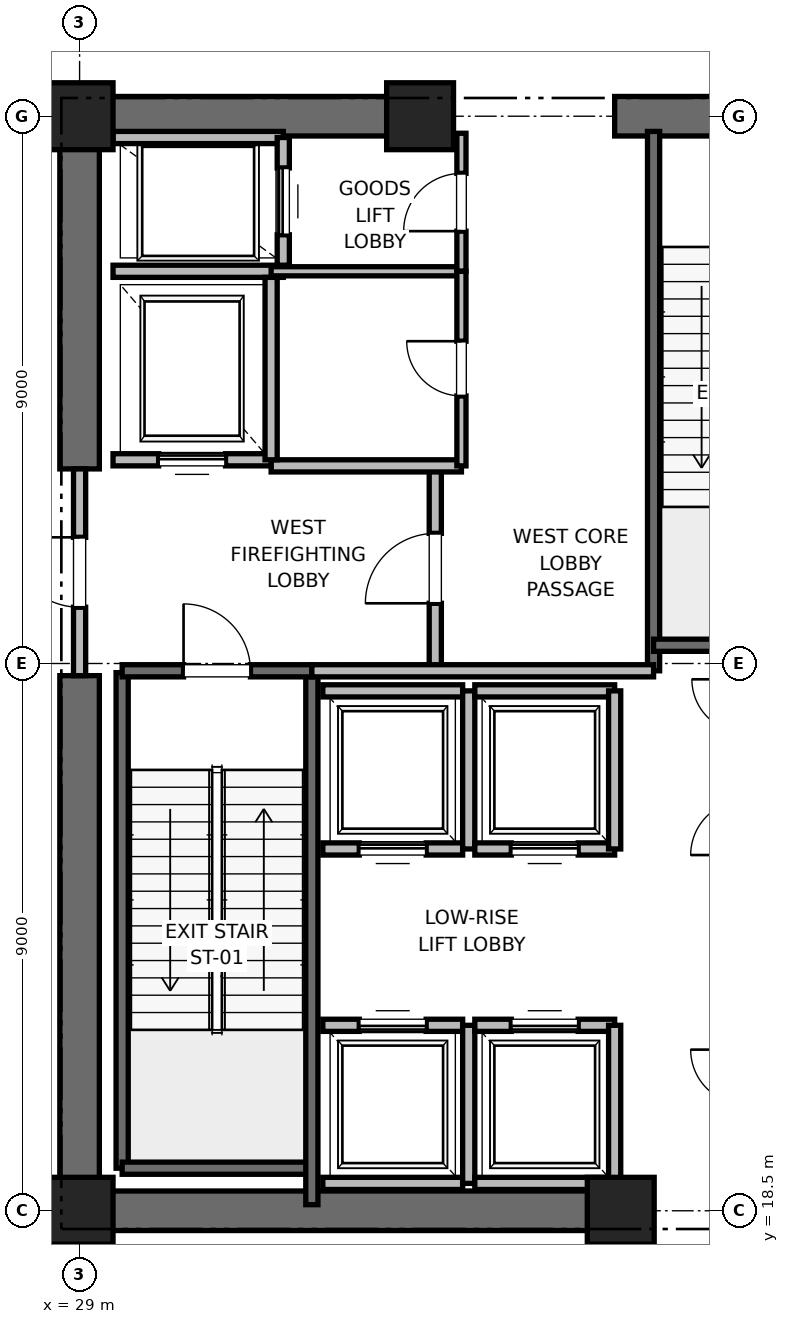
"""IFC4 building model, lengths in metres.
Left out: names, types, materials, properties, quantities, classifications, styles, units other than length and angle.
Written with IfcOpenShell. Run it as: python <this file> out.ifc"""

import sys

from ifc_helpers import new_model, si_unit, direction, frame, frame_2d, origin, origin_2d, place, context, subcontext, project, spatial, rectangle, extrude, element, fill, save


model = new_model("IFC4")
c1 = context("Model", 3, precision=1e-05, world=origin(), true_north=direction((0.0, 1.0)))
c2 = subcontext(c1, "Body", "Model", "MODEL_VIEW")
j1 = project(units=[si_unit("LENGTHUNIT", "METRE"), si_unit("PLANEANGLEUNIT", "RADIAN")], contexts=[c1])
p1 = place(None, origin())
s1 = spatial("IfcSite", under=j1, at=p1, CompositionType="ELEMENT")
p2 = place(p1, origin())
s2 = spatial("IfcBuilding", under=s1, at=p2, CompositionType="ELEMENT")
p3 = place(p2, frame((0.0, 0.0, 113.0)))
s3 = spatial("IfcBuildingStorey", under=s2, at=p3, CompositionType="ELEMENT", Elevation=113.0)
for number, where, z_axis, x_axis in (
    (1, (29.0, 18.5, 0.0), (0.0, 0.0, 1.0), (1.0, 0.0, 0.0)),
    (2, (29.0, 36.5, 0.0), (0.0, 0.0, 1.0), (1.0, 0.0, 0.0)),
    (3, (37.9, 18.5, 0.0), (0.0, 0.0, 1.0), (1.0, 0.0, 0.0)),
    (4, (34.6, 36.5, 0.0), (0.0, 0.0, 1.0), (1.0, 0.0, 0.0)),
):
    element("IfcColumn", number, at=place(p3, frame(where, z_axis=z_axis, x_axis=x_axis)), inside=s3, PredefinedType="PILASTER", context=c2, shape_type="SweptSolid", body=[
        extrude(rectangle(XDim=1.1, YDim=1.1, at=origin_2d()), origin(), (0.0, 0.0, 1.0), 5.4),
    ])
p4 = place(p3, frame((29.0, 18.5, 0.0), z_axis=(0.0, 0.0, 1.0), x_axis=(1.0, 0.0, 0.0)))
e5 = element("IfcWall", 5, at=p4, inside=s3, PredefinedType="SHEAR", context=c2, shape_type="SweptSolid", body=[
    extrude(rectangle(XDim=9.2, YDim=0.65, at=frame_2d((4.6, 0.0))), origin(), (0.0, 0.0, 1.0), 5.1),
])
p5 = place(p3, frame((29.0, 36.5, 0.0), z_axis=(0.0, 0.0, 1.0), x_axis=(1.0, 0.0, 0.0)))
e6 = element("IfcWall", 6, at=p5, inside=s3, PredefinedType="SHEAR", context=c2, shape_type="SweptSolid", body=[
    extrude(rectangle(XDim=5.8, YDim=0.65, at=frame_2d((2.9, 0.0))), origin(), (0.0, 0.0, 1.0), 5.1),
])
p6 = place(p3, frame((37.8, 36.5, 0.0), z_axis=(0.0, 0.0, 1.0), x_axis=(1.0, 0.0, 0.0)))
e7 = element("IfcWall", 7, at=p6, inside=s3, PredefinedType="SHEAR", context=c2, shape_type="SweptSolid", body=[
    extrude(rectangle(XDim=4.4, YDim=0.65, at=frame_2d((2.2, 0.0))), origin(), (0.0, 0.0, 1.0), 5.1),
])
p7 = place(p6, frame((1.65, 0.0, 0.0)))
e8 = element("IfcOpeningElement", 8, at=p7, cuts=e7, PredefinedType="OPENING", context=c2, shape_type="SweptSolid", body=[
    extrude(rectangle(XDim=1.1, YDim=2.15, at=frame_2d((0.55, 1.075))), frame((0.0, 0.325, 0.0), z_axis=(0.0, -1.0, 0.0), x_axis=(1.0, 0.0, 0.0)), (0.0, 0.0, 1.0), 0.65),
])
p8 = place(p3, frame((29.0, 18.5, 0.0), z_axis=(0.0, 0.0, 1.0), x_axis=(0.0, 1.0, 0.0)))
e9 = element("IfcWall", 9, at=p8, inside=s3, PredefinedType="SHEAR", context=c2, shape_type="SweptSolid", body=[
    extrude(rectangle(XDim=8.8, YDim=0.65, at=frame_2d((4.4, 0.0))), origin(), (0.0, 0.0, 1.0), 5.1),
])
p9 = place(p3, frame((29.0, 30.7, 0.0), z_axis=(0.0, 0.0, 1.0), x_axis=(0.0, 1.0, 0.0)))
e10 = element("IfcWall", 10, at=p9, inside=s3, PredefinedType="SHEAR", context=c2, shape_type="SweptSolid", body=[
    extrude(rectangle(XDim=5.8, YDim=0.65, at=frame_2d((2.9, 0.0))), origin(), (0.0, 0.0, 1.0), 5.1),
])
p10 = place(p3, frame((29.7, 19.2, 0.0), z_axis=(0.0, 0.0, 1.0), x_axis=(0.0, 1.0, 0.0)))
e11 = element("IfcWall", 11, at=p10, inside=s3, PredefinedType="SOLIDWALL", context=c2, shape_type="SweptSolid", body=[
    extrude(rectangle(XDim=8.15, YDim=0.2, at=frame_2d((4.075, 0.0))), origin(), (0.0, 0.0, 1.0), 5.1),
])
p11 = place(p3, frame((29.7, 19.2, 0.0), z_axis=(0.0, 0.0, 1.0), x_axis=(1.0, 0.0, 0.0)))
e12 = element("IfcWall", 12, at=p11, inside=s3, PredefinedType="SOLIDWALL", context=c2, shape_type="SweptSolid", body=[
    extrude(rectangle(XDim=3.12, YDim=0.2, at=frame_2d((1.56, 0.0))), origin(), (0.0, 0.0, 1.0), 5.1),
])
p12 = place(p3, frame((32.82, 18.6, 0.0), z_axis=(0.0, 0.0, 1.0), x_axis=(0.0, 1.0, 0.0)))
e13 = element("IfcWall", 13, at=p12, inside=s3, PredefinedType="SOLIDWALL", context=c2, shape_type="SweptSolid", body=[
    extrude(rectangle(XDim=8.78, YDim=0.2, at=frame_2d((4.39, 0.0))), origin(), (0.0, 0.0, 1.0), 5.1),
])
p13 = place(p3, frame((29.7, 27.38, 0.0), z_axis=(0.0, 0.0, 1.0), x_axis=(1.0, 0.0, 0.0)))
e14 = element("IfcWall", 14, at=p13, inside=s3, PredefinedType="SOLIDWALL", context=c2, shape_type="SweptSolid", body=[
    extrude(rectangle(XDim=3.12, YDim=0.2, at=frame_2d((1.56, 0.0))), origin(), (0.0, 0.0, 1.0), 5.1),
])
p14 = place(p13, frame((1.01, 0.0, 0.0)))
e15 = element("IfcOpeningElement", 15, at=p14, cuts=e14, PredefinedType="OPENING", context=c2, shape_type="SweptSolid", body=[
    extrude(rectangle(XDim=1.1, YDim=2.15, at=frame_2d((0.55, 1.075))), frame((0.0, 0.1, 0.0), z_axis=(0.0, -1.0, 0.0), x_axis=(1.0, 0.0, 0.0)), (0.0, 0.0, 1.0), 0.2),
])
p15 = place(p3, frame((38.44, 27.38, 0.0), z_axis=(0.0, 0.0, 1.0), x_axis=(0.0, 1.0, 0.0)))
e16 = element("IfcWall", 16, at=p15, inside=s3, PredefinedType="SOLIDWALL", context=c2, shape_type="SweptSolid", body=[
    extrude(rectangle(XDim=8.87, YDim=0.2, at=frame_2d((4.435, 0.0))), origin(), (0.0, 0.0, 1.0), 5.1),
])
p16 = place(p3, frame((38.44, 27.8, 0.0), z_axis=(0.0, 0.0, 1.0), x_axis=(1.0, 0.0, 0.0)))
e17 = element("IfcWall", 17, at=p16, inside=s3, PredefinedType="SOLIDWALL", context=c2, shape_type="SweptSolid", body=[
    extrude(rectangle(XDim=3.32, YDim=0.2, at=frame_2d((1.66, 0.0))), origin(), (0.0, 0.0, 1.0), 5.1),
])
p17 = place(p3, frame((34.85, 27.38, 0.0), z_axis=(0.0, 0.0, 1.0), x_axis=(0.0, 1.0, 0.0)))
e18 = element("IfcWall", 18, at=p17, inside=s3, PredefinedType="PARTITIONING", context=c2, shape_type="SweptSolid", body=[
    extrude(rectangle(XDim=3.37, YDim=0.2, at=frame_2d((1.685, 0.0))), origin(), (0.0, 0.0, 1.0), 5.1),
])
p18 = place(p17, frame((1.11, 0.0, 0.0)))
e19 = element("IfcOpeningElement", 19, at=p18, cuts=e18, PredefinedType="OPENING", context=c2, shape_type="SweptSolid", body=[
    extrude(rectangle(XDim=1.15, YDim=2.2, at=frame_2d((0.575, 1.1))), frame((0.0, 0.1, 0.0), z_axis=(0.0, -1.0, 0.0), x_axis=(1.0, 0.0, 0.0)), (0.0, 0.0, 1.0), 0.2),
])
p19 = place(p3, frame((29.0, 27.3, 0.0), z_axis=(0.0, 0.0, 1.0), x_axis=(0.0, 1.0, 0.0)))
e20 = element("IfcWall", 20, at=p19, inside=s3, PredefinedType="PARTITIONING", context=c2, shape_type="SweptSolid", body=[
    extrude(rectangle(XDim=3.4, YDim=0.2, at=frame_2d((1.7, 0.0))), origin(), (0.0, 0.0, 1.0), 3.88),
])
p20 = place(p19, frame((1.125, 0.0, 0.0)))
e21 = element("IfcOpeningElement", 21, at=p20, cuts=e20, PredefinedType="OPENING", context=c2, shape_type="SweptSolid", body=[
    extrude(rectangle(XDim=1.15, YDim=2.2, at=frame_2d((0.575, 1.1))), frame((0.0, 0.1, 0.0), z_axis=(0.0, -1.0, 0.0), x_axis=(1.0, 0.0, 0.0)), (0.0, 0.0, 1.0), 0.2),
])
p21 = place(p3, frame((32.82, 27.38, 0.0), z_axis=(0.0, 0.0, 1.0), x_axis=(1.0, 0.0, 0.0)))
e22 = element("IfcWall", 22, at=p21, inside=s3, PredefinedType="PARTITIONING", context=c2, shape_type="SweptSolid", body=[
    extrude(rectangle(XDim=5.62, YDim=0.2, at=frame_2d((2.81, 0.0))), origin(), (0.0, 0.0, 1.0), 5.1),
])
p22 = place(p3, frame((32.15, 30.75, 0.0), z_axis=(0.0, 0.0, 1.0), x_axis=(1.0, 0.0, 0.0)))
e23 = element("IfcWall", 23, at=p22, inside=s3, PredefinedType="PARTITIONING", context=c2, shape_type="SweptSolid", body=[
    extrude(rectangle(XDim=3.13, YDim=0.2, at=frame_2d((1.565, 0.0))), origin(), (0.0, 0.0, 1.0), 5.1),
])
p23 = place(p3, frame((29.55, 30.85, 0.0), z_axis=(0.0, 0.0, 1.0), x_axis=(1.0, 0.0, 0.0)))
e24 = element("IfcWall", 24, at=p23, inside=s3, PredefinedType="SOLIDWALL", context=c2, shape_type="SweptSolid", body=[
    extrude(rectangle(XDim=2.6, YDim=0.2, at=frame_2d((1.3, 0.0))), origin(), (0.0, 0.0, 1.0), 3.88),
])
p24 = place(p23, frame((0.75, 0.0, 0.0)))
e25 = element("IfcOpeningElement", 25, at=p24, cuts=e24, PredefinedType="OPENING", context=c2, shape_type="SweptSolid", body=[
    extrude(rectangle(XDim=1.1, YDim=2.2, at=frame_2d((0.55, 1.1))), frame((0.0, 0.1, 0.0), z_axis=(0.0, -1.0, 0.0), x_axis=(1.0, 0.0, 0.0)), (0.0, 0.0, 1.0), 0.2),
])
p25 = place(p3, frame((29.55, 33.95, 0.0), z_axis=(0.0, 0.0, 1.0), x_axis=(1.0, 0.0, 0.0)))
e26 = element("IfcWall", 26, at=p25, inside=s3, PredefinedType="SOLIDWALL", context=c2, shape_type="SweptSolid", body=[
    extrude(rectangle(XDim=2.8, YDim=0.2, at=frame_2d((1.4, 0.0))), origin(), (0.0, 0.0, 1.0), 5.1),
])
p26 = place(p3, frame((32.15, 30.85, 0.0), z_axis=(0.0, 0.0, 1.0), x_axis=(0.0, 1.0, 0.0)))
e27 = element("IfcWall", 27, at=p26, inside=s3, PredefinedType="SOLIDWALL", context=c2, shape_type="SweptSolid", body=[
    extrude(rectangle(XDim=3.0, YDim=0.2, at=frame_2d((1.5, 0.0))), origin(), (0.0, 0.0, 1.0), 5.1),
])
p27 = place(p3, frame((32.35, 36.15, 0.0), z_axis=(0.0, 0.0, 1.0), x_axis=(-1.0, 0.0, 0.0)))
e28 = element("IfcWall", 28, at=p27, inside=s3, PredefinedType="SOLIDWALL", context=c2, shape_type="SweptSolid", body=[
    extrude(rectangle(XDim=2.8, YDim=0.2, at=frame_2d((1.4, 0.0))), origin(), (0.0, 0.0, 1.0), 4.153),
])
p28 = place(p3, frame((32.35, 34.05, 0.0), z_axis=(0.0, 0.0, 1.0), x_axis=(0.0, 1.0, 0.0)))
e29 = element("IfcWall", 29, at=p28, inside=s3, PredefinedType="SOLIDWALL", context=c2, shape_type="SweptSolid", body=[
    extrude(rectangle(XDim=2.1, YDim=0.2, at=frame_2d((1.05, 0.0))), origin(), (0.0, 0.0, 1.0), 5.1),
])
p29 = place(p28, frame((0.5, 0.0, 0.0)))
e30 = element("IfcOpeningElement", 30, at=p29, cuts=e29, PredefinedType="OPENING", context=c2, shape_type="SweptSolid", body=[
    extrude(rectangle(XDim=1.1, YDim=2.2, at=frame_2d((0.55, 1.1))), frame((0.0, 0.1, 0.0), z_axis=(0.0, -1.0, 0.0), x_axis=(1.0, 0.0, 0.0)), (0.0, 0.0, 1.0), 0.2),
])
p30 = place(p3, frame((33.0, 18.95, 0.0), z_axis=(0.0, 0.0, 1.0), x_axis=(1.0, 0.0, 0.0)))
e31 = element("IfcWall", 31, at=p30, inside=s3, PredefinedType="SOLIDWALL", context=c2, shape_type="SweptSolid", body=[
    extrude(rectangle(XDim=2.3, YDim=0.2, at=frame_2d((1.15, 0.0))), origin(), (0.0, 0.0, 1.0), 5.1),
])
p31 = place(p3, frame((35.3, 21.55, 0.0), z_axis=(0.0, 0.0, 1.0), x_axis=(-1.0, 0.0, 0.0)))
e32 = element("IfcWall", 32, at=p31, inside=s3, PredefinedType="SOLIDWALL", context=c2, shape_type="SweptSolid", body=[
    extrude(rectangle(XDim=2.3, YDim=0.2, at=frame_2d((1.15, 0.0))), origin(), (0.0, 0.0, 1.0), 5.1),
])
p32 = place(p31, frame((0.6, 0.0, 0.0)))
e33 = element("IfcOpeningElement", 33, at=p32, cuts=e32, PredefinedType="OPENING", context=c2, shape_type="SweptSolid", body=[
    extrude(rectangle(XDim=1.1, YDim=2.2, at=frame_2d((0.55, 1.1))), frame((0.0, 0.1, 0.0), z_axis=(0.0, -1.0, 0.0), x_axis=(1.0, 0.0, 0.0)), (0.0, 0.0, 1.0), 0.2),
])
p33 = place(p3, frame((35.4, 18.95, 0.0), z_axis=(0.0, 0.0, 1.0), x_axis=(0.0, 1.0, 0.0)))
e34 = element("IfcWall", 34, at=p33, inside=s3, PredefinedType="SOLIDWALL", context=c2, shape_type="SweptSolid", body=[
    extrude(rectangle(XDim=2.6, YDim=0.2, at=frame_2d((1.3, 0.0))), origin(), (0.0, 0.0, 1.0), 5.1),
])
p34 = place(p3, frame((35.5, 18.95, 0.0), z_axis=(0.0, 0.0, 1.0), x_axis=(1.0, 0.0, 0.0)))
e35 = element("IfcWall", 35, at=p34, inside=s3, PredefinedType="SOLIDWALL", context=c2, shape_type="SweptSolid", body=[
    extrude(rectangle(XDim=2.3, YDim=0.2, at=frame_2d((1.15, 0.0))), origin(), (0.0, 0.0, 1.0), 3.88),
])
p35 = place(p3, frame((37.8, 21.55, 0.0), z_axis=(0.0, 0.0, 1.0), x_axis=(-1.0, 0.0, 0.0)))
e36 = element("IfcWall", 36, at=p35, inside=s3, PredefinedType="SOLIDWALL", context=c2, shape_type="SweptSolid", body=[
    extrude(rectangle(XDim=2.3, YDim=0.2, at=frame_2d((1.15, 0.0))), origin(), (0.0, 0.0, 1.0), 5.1),
])
p36 = place(p35, frame((0.6, 0.0, 0.0)))
e37 = element("IfcOpeningElement", 37, at=p36, cuts=e36, PredefinedType="OPENING", context=c2, shape_type="SweptSolid", body=[
    extrude(rectangle(XDim=1.1, YDim=2.2, at=frame_2d((0.55, 1.1))), frame((0.0, 0.1, 0.0), z_axis=(0.0, -1.0, 0.0), x_axis=(1.0, 0.0, 0.0)), (0.0, 0.0, 1.0), 0.2),
])
p37 = place(p3, frame((37.8, 18.95, 0.0), z_axis=(0.0, 0.0, 1.0), x_axis=(0.0, 1.0, 0.0)))
e38 = element("IfcWall", 38, at=p37, inside=s3, PredefinedType="SOLIDWALL", context=c2, shape_type="SweptSolid", body=[
    extrude(rectangle(XDim=2.6, YDim=0.2, at=frame_2d((1.3, 0.0))), origin(), (0.0, 0.0, 1.0), 3.88),
])
p38 = place(p3, frame((33.0, 24.45, 0.0), z_axis=(0.0, 0.0, 1.0), x_axis=(1.0, 0.0, 0.0)))
e39 = element("IfcWall", 39, at=p38, inside=s3, PredefinedType="SOLIDWALL", context=c2, shape_type="SweptSolid", body=[
    extrude(rectangle(XDim=2.3, YDim=0.2, at=frame_2d((1.15, 0.0))), origin(), (0.0, 0.0, 1.0), 5.1),
])
p39 = place(p38, frame((0.6, 0.0, 0.0)))
e40 = element("IfcOpeningElement", 40, at=p39, cuts=e39, PredefinedType="OPENING", context=c2, shape_type="SweptSolid", body=[
    extrude(rectangle(XDim=1.1, YDim=2.2, at=frame_2d((0.55, 1.1))), frame((0.0, 0.1, 0.0), z_axis=(0.0, -1.0, 0.0), x_axis=(1.0, 0.0, 0.0)), (0.0, 0.0, 1.0), 0.2),
])
p40 = place(p3, frame((35.3, 27.05, 0.0), z_axis=(0.0, 0.0, 1.0), x_axis=(-1.0, 0.0, 0.0)))
e41 = element("IfcWall", 41, at=p40, inside=s3, PredefinedType="SOLIDWALL", context=c2, shape_type="SweptSolid", body=[
    extrude(rectangle(XDim=2.3, YDim=0.2, at=frame_2d((1.15, 0.0))), origin(), (0.0, 0.0, 1.0), 5.1),
])
p41 = place(p3, frame((35.4, 24.45, 0.0), z_axis=(0.0, 0.0, 1.0), x_axis=(0.0, 1.0, 0.0)))
e42 = element("IfcWall", 42, at=p41, inside=s3, PredefinedType="SOLIDWALL", context=c2, shape_type="SweptSolid", body=[
    extrude(rectangle(XDim=2.6, YDim=0.2, at=frame_2d((1.3, 0.0))), origin(), (0.0, 0.0, 1.0), 5.1),
])
p42 = place(p3, frame((35.5, 24.45, 0.0), z_axis=(0.0, 0.0, 1.0), x_axis=(1.0, 0.0, 0.0)))
e43 = element("IfcWall", 43, at=p42, inside=s3, PredefinedType="SOLIDWALL", context=c2, shape_type="SweptSolid", body=[
    extrude(rectangle(XDim=2.3, YDim=0.2, at=frame_2d((1.15, 0.0))), origin(), (0.0, 0.0, 1.0), 5.1),
])
p43 = place(p42, frame((0.6, 0.0, 0.0)))
e44 = element("IfcOpeningElement", 44, at=p43, cuts=e43, PredefinedType="OPENING", context=c2, shape_type="SweptSolid", body=[
    extrude(rectangle(XDim=1.1, YDim=2.2, at=frame_2d((0.55, 1.1))), frame((0.0, 0.1, 0.0), z_axis=(0.0, -1.0, 0.0), x_axis=(1.0, 0.0, 0.0)), (0.0, 0.0, 1.0), 0.2),
])
p44 = place(p3, frame((37.8, 27.05, 0.0), z_axis=(0.0, 0.0, 1.0), x_axis=(-1.0, 0.0, 0.0)))
e45 = element("IfcWall", 45, at=p44, inside=s3, PredefinedType="SOLIDWALL", context=c2, shape_type="SweptSolid", body=[
    extrude(rectangle(XDim=2.3, YDim=0.2, at=frame_2d((1.15, 0.0))), origin(), (0.0, 0.0, 1.0), 5.1),
])
p45 = place(p3, frame((37.8, 24.45, 0.0), z_axis=(0.0, 0.0, 1.0), x_axis=(0.0, 1.0, 0.0)))
e46 = element("IfcWall", 46, at=p45, inside=s3, PredefinedType="SOLIDWALL", context=c2, shape_type="SweptSolid", body=[
    extrude(rectangle(XDim=2.6, YDim=0.2, at=frame_2d((1.3, 0.0))), origin(), (0.0, 0.0, 1.0), 5.1),
])
p46 = place(p3, frame((32.15, 33.95, 0.0), z_axis=(0.0, 0.0, 1.0), x_axis=(1.0, 0.0, 0.0)))
e47 = element("IfcWall", 47, at=p46, inside=s3, PredefinedType="PARTITIONING", context=c2, shape_type="SweptSolid", body=[
    extrude(rectangle(XDim=3.13, YDim=0.15, at=frame_2d((1.565, 0.0))), origin(), (0.0, 0.0, 1.0), 2.85),
])
p47 = place(p3, frame((35.28, 33.95, 0.0), z_axis=(0.0, 0.0, 1.0), x_axis=(0.0, 1.0, 0.0)))
e48 = element("IfcWall", 48, at=p47, inside=s3, PredefinedType="PARTITIONING", context=c2, shape_type="SweptSolid", body=[
    extrude(rectangle(XDim=2.27, YDim=0.15, at=frame_2d((1.135, 0.0))), origin(), (0.0, 0.0, 1.0), 2.85),
])
p48 = place(p47, frame((0.66, 0.0, 0.0)))
e49 = element("IfcOpeningElement", 49, at=p48, cuts=e48, PredefinedType="OPENING", context=c2, shape_type="SweptSolid", body=[
    extrude(rectangle(XDim=0.95, YDim=2.15, at=frame_2d((0.475, 1.075))), frame((0.0, 0.075, 0.0), z_axis=(0.0, -1.0, 0.0), x_axis=(1.0, 0.0, 0.0)), (0.0, 0.0, 1.0), 0.15),
])
p49 = place(p3, frame((35.28, 30.75, 0.0), z_axis=(0.0, 0.0, 1.0), x_axis=(0.0, 1.0, 0.0)))
e50 = element("IfcWall", 50, at=p49, inside=s3, PredefinedType="PARTITIONING", context=c2, shape_type="SweptSolid", body=[
    extrude(rectangle(XDim=3.2, YDim=0.15, at=frame_2d((1.6, 0.0))), origin(), (0.0, 0.0, 1.0), 2.85),
])
p50 = place(p49, frame((1.15, 0.0, 0.0)))
e51 = element("IfcOpeningElement", 51, at=p50, cuts=e50, PredefinedType="OPENING", context=c2, shape_type="SweptSolid", body=[
    extrude(rectangle(XDim=0.9, YDim=2.1, at=frame_2d((0.45, 1.05))), frame((0.0, 0.075, 0.0), z_axis=(0.0, -1.0, 0.0), x_axis=(1.0, 0.0, 0.0)), (0.0, 0.0, 1.0), 0.15),
])
p51 = place(p14, origin())
e52 = element("IfcDoor", 52, at=p51, inside=s3, OperationType="SINGLE_SWING_LEFT", PredefinedType="DOOR", context=c2, shape_type="SweptSolid", body=[
    extrude(rectangle(XDim=1.1, YDim=2.15, at=frame_2d((0.55, 1.075))), frame((0.0, 0.025, 0.0), z_axis=(0.0, -1.0, 0.0), x_axis=(1.0, 0.0, 0.0)), (0.0, 0.0, 1.0), 0.05),
])
fill(e15, e52)
p52 = place(p18, origin())
e53 = element("IfcDoor", 53, at=p52, inside=s3, OperationType="SINGLE_SWING_LEFT", PredefinedType="DOOR", context=c2, shape_type="SweptSolid", body=[
    extrude(rectangle(XDim=1.15, YDim=2.2, at=frame_2d((0.575, 1.1))), frame((0.0, 0.025, 0.0), z_axis=(0.0, -1.0, 0.0), x_axis=(1.0, 0.0, 0.0)), (0.0, 0.0, 1.0), 0.05),
])
fill(e19, e53)
p53 = place(p20, origin())
e54 = element("IfcDoor", 54, at=p53, inside=s3, OperationType="SINGLE_SWING_RIGHT", PredefinedType="DOOR", context=c2, shape_type="SweptSolid", body=[
    extrude(rectangle(XDim=1.15, YDim=2.2, at=frame_2d((0.575, 1.1))), frame((0.0, 0.025, 0.0), z_axis=(0.0, -1.0, 0.0), x_axis=(1.0, 0.0, 0.0)), (0.0, 0.0, 1.0), 0.05),
])
fill(e21, e54)
p54 = place(p24, origin())
e55 = element("IfcDoor", 55, at=p54, inside=s3, OperationType="SLIDING_TO_RIGHT", PredefinedType="DOOR", context=c2, shape_type="SweptSolid", body=[
    extrude(rectangle(XDim=1.1, YDim=2.2, at=frame_2d((0.55, 1.1))), frame((0.0, 0.025, 0.0), z_axis=(0.0, -1.0, 0.0), x_axis=(1.0, 0.0, 0.0)), (0.0, 0.0, 1.0), 0.05),
])
fill(e25, e55)
p55 = place(p29, origin())
e56 = element("IfcDoor", 56, at=p55, inside=s3, OperationType="SLIDING_TO_RIGHT", PredefinedType="DOOR", context=c2, shape_type="SweptSolid", body=[
    extrude(rectangle(XDim=1.1, YDim=2.2, at=frame_2d((0.55, 1.1))), frame((0.0, 0.025, 0.0), z_axis=(0.0, -1.0, 0.0), x_axis=(1.0, 0.0, 0.0)), (0.0, 0.0, 1.0), 0.05),
])
fill(e30, e56)
p56 = place(p32, origin())
e57 = element("IfcDoor", 57, at=p56, inside=s3, OperationType="SLIDING_TO_RIGHT", PredefinedType="DOOR", context=c2, shape_type="SweptSolid", body=[
    extrude(rectangle(XDim=1.1, YDim=2.2, at=frame_2d((0.55, 1.1))), frame((0.0, 0.025, 0.0), z_axis=(0.0, -1.0, 0.0), x_axis=(1.0, 0.0, 0.0)), (0.0, 0.0, 1.0), 0.05),
])
fill(e33, e57)
p57 = place(p36, origin())
e58 = element("IfcDoor", 58, at=p57, inside=s3, OperationType="SLIDING_TO_RIGHT", PredefinedType="DOOR", context=c2, shape_type="SweptSolid", body=[
    extrude(rectangle(XDim=1.1, YDim=2.2, at=frame_2d((0.55, 1.1))), frame((0.0, 0.025, 0.0), z_axis=(0.0, -1.0, 0.0), x_axis=(1.0, 0.0, 0.0)), (0.0, 0.0, 1.0), 0.05),
])
fill(e37, e58)
p58 = place(p39, origin())
e59 = element("IfcDoor", 59, at=p58, inside=s3, OperationType="SLIDING_TO_RIGHT", PredefinedType="DOOR", context=c2, shape_type="SweptSolid", body=[
    extrude(rectangle(XDim=1.1, YDim=2.2, at=frame_2d((0.55, 1.1))), frame((0.0, 0.025, 0.0), z_axis=(0.0, -1.0, 0.0), x_axis=(1.0, 0.0, 0.0)), (0.0, 0.0, 1.0), 0.05),
])
fill(e40, e59)
p59 = place(p43, origin())
e60 = element("IfcDoor", 60, at=p59, inside=s3, OperationType="SLIDING_TO_RIGHT", PredefinedType="DOOR", context=c2, shape_type="SweptSolid", body=[
    extrude(rectangle(XDim=1.1, YDim=2.2, at=frame_2d((0.55, 1.1))), frame((0.0, 0.025, 0.0), z_axis=(0.0, -1.0, 0.0), x_axis=(1.0, 0.0, 0.0)), (0.0, 0.0, 1.0), 0.05),
])
fill(e44, e60)
p60 = place(p48, origin())
e61 = element("IfcDoor", 61, at=p60, inside=s3, OperationType="SINGLE_SWING_LEFT", PredefinedType="DOOR", context=c2, shape_type="SweptSolid", body=[
    extrude(rectangle(XDim=0.95, YDim=2.15, at=frame_2d((0.475, 1.075))), frame((0.0, 0.025, 0.0), z_axis=(0.0, -1.0, 0.0), x_axis=(1.0, 0.0, 0.0)), (0.0, 0.0, 1.0), 0.05),
])
fill(e49, e61)
p61 = place(p50, origin())
e62 = element("IfcDoor", 62, at=p61, inside=s3, OperationType="SINGLE_SWING_RIGHT", PredefinedType="DOOR", context=c2, shape_type="SweptSolid", body=[
    extrude(rectangle(XDim=0.9, YDim=2.1, at=frame_2d((0.45, 1.05))), frame((0.0, 0.025, 0.0), z_axis=(0.0, -1.0, 0.0), x_axis=(1.0, 0.0, 0.0)), (0.0, 0.0, 1.0), 0.05),
])
fill(e51, e62)
save(model, sys.argv[1])
